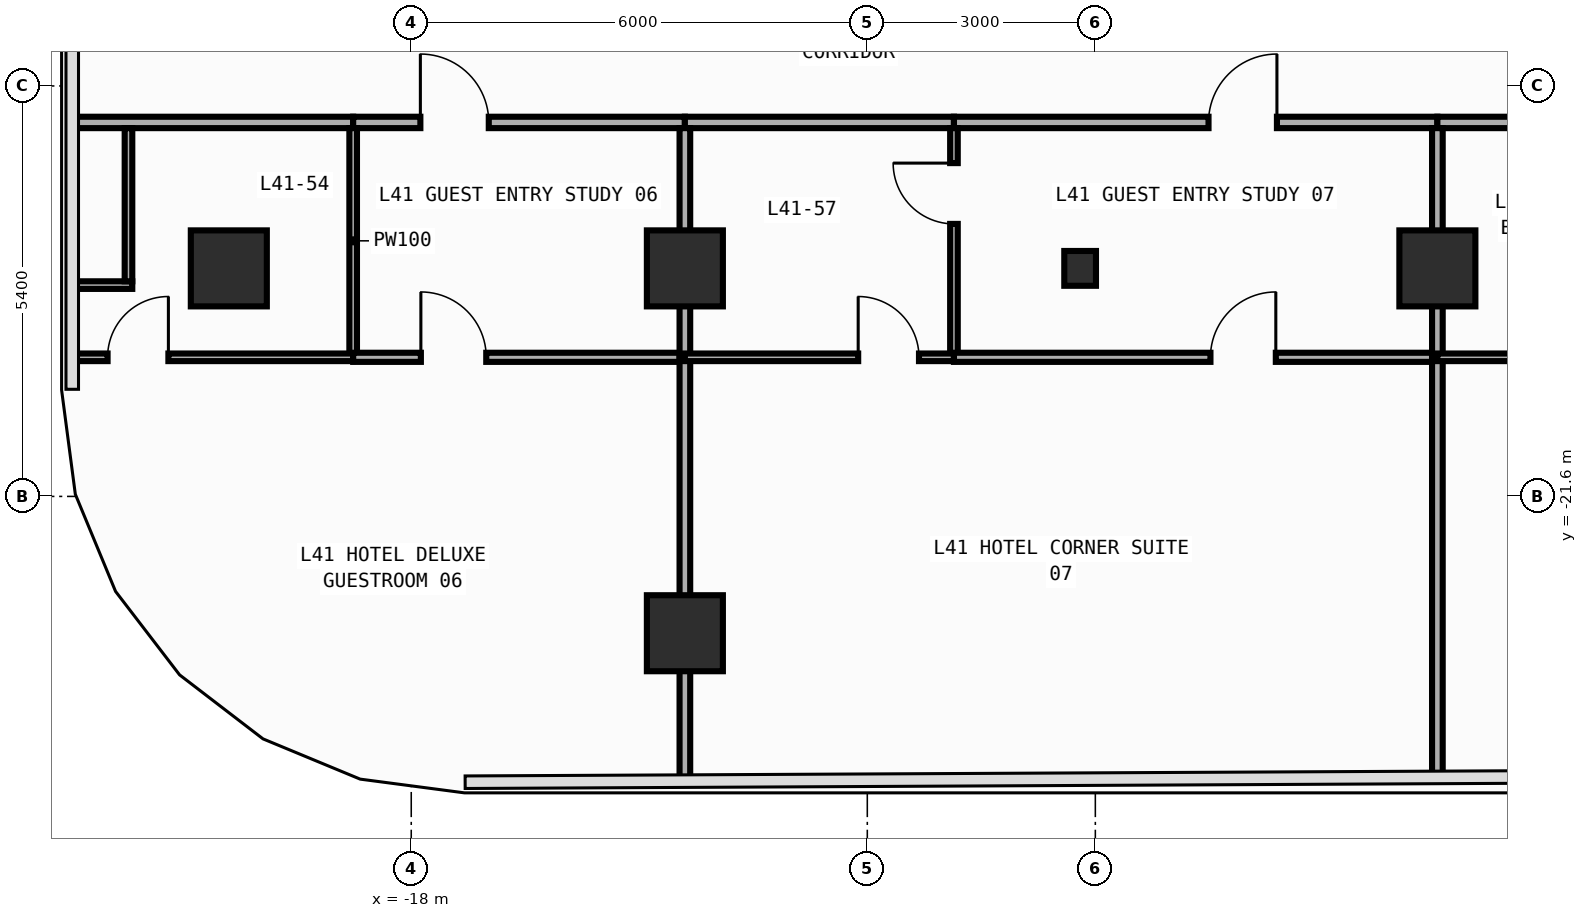
"""IFC4 building model, lengths in metres.
Left out: names, types, materials, properties, quantities, classifications, styles, units other than length and angle.
Written with IfcOpenShell. Run it as: python <this file> out.ifc"""

import sys

from ifc_helpers import new_model, si_unit, direction, frame, frame_2d, origin, origin_2d, place, context, subcontext, project, spatial, rectangle, i_section, extrude, element, fill, save


model = new_model("IFC4")
c1 = context("Model", 3, precision=1e-05, world=origin(), true_north=direction((0.0, 1.0)))
c2 = subcontext(c1, "Body", "Model", "MODEL_VIEW")
j1 = project(units=[si_unit("LENGTHUNIT", "METRE"), si_unit("PLANEANGLEUNIT", "RADIAN")], contexts=[c1])
p1 = place(None, origin())
s1 = spatial("IfcSite", under=j1, at=p1, CompositionType="ELEMENT")
p2 = place(p1, origin())
s2 = spatial("IfcBuilding", under=s1, at=p2, CompositionType="ELEMENT")
p3 = place(p2, frame((0.0, 0.0, 180.2)))
s3 = spatial("IfcBuildingStorey", under=s2, at=p3, CompositionType="ELEMENT", Elevation=180.2)
p4 = place(p3, frame((-9.2, -18.6, 0.0), z_axis=(0.0, 0.0, 1.0), x_axis=(1.0, 0.0, 0.0)))
e1 = element("IfcColumn", 1, at=p4, inside=s3, PredefinedType="COLUMN", context=c2, shape_type="SweptSolid", body=[
    extrude(i_section(OverallWidth=0.417, OverallDepth=0.458, WebThickness=0.03, FlangeThickness=0.05, FilletRadius=0.022, at=origin_2d()), origin(), (0.0, 0.0, 1.0), 3.8),
])
for number, where, z_axis, x_axis in (
    (2, (-20.4, -18.6, 0.0), (0.0, 0.0, 1.0), (1.0, 0.0, 0.0)),
    (3, (-14.4, -18.6, 0.0), (0.0, 0.0, 1.0), (1.0, 0.0, 0.0)),
    (4, (-4.5, -18.6, 0.0), (0.0, 0.0, 1.0), (1.0, 0.0, 0.0)),
    (5, (-14.4, -23.4, 0.0), (0.0, 0.0, 1.0), (1.0, 0.0, 0.0)),
):
    element("IfcColumn", number, at=place(p3, frame(where, z_axis=z_axis, x_axis=x_axis)), inside=s3, PredefinedType="COLUMN", context=c2, shape_type="SweptSolid", body=[
        extrude(rectangle(XDim=1.0, YDim=1.0, at=origin_2d()), origin(), (0.0, 0.0, 1.0), 3.8),
    ])
p5 = place(p3, frame((-22.455, -16.68, 0.0), z_axis=(0.0, 0.0, 1.0), x_axis=(1.0, 0.0, 0.0)))
e6 = element("IfcWall", 6, at=p5, inside=s3, PredefinedType="PARTITIONING", context=c2, shape_type="SweptSolid", body=[
    extrude(rectangle(XDim=3.691, YDim=0.15, at=frame_2d((1.846, 0.0))), origin(), (0.0, 0.0, 1.0), 3.54),
])
p6 = place(p3, frame((-18.764, -16.68, 0.0), z_axis=(0.0, 0.0, 1.0), x_axis=(1.0, 0.0, 0.0)))
e7 = element("IfcWall", 7, at=p6, inside=s3, PredefinedType="PARTITIONING", context=c2, shape_type="SweptSolid", body=[
    extrude(rectangle(XDim=4.364, YDim=0.15, at=frame_2d((2.182, 0.0))), origin(), (0.0, 0.0, 1.0), 3.54),
])
p7 = place(p6, frame((0.884, 0.0, 0.0)))
e8 = element("IfcOpeningElement", 8, at=p7, cuts=e7, PredefinedType="OPENING", context=c2, shape_type="SweptSolid", body=[
    extrude(rectangle(XDim=0.9, YDim=2.15, at=frame_2d((0.45, 1.075))), frame((0.0, 0.085, 0.0), z_axis=(0.0, -1.0, 0.0), x_axis=(1.0, 0.0, 0.0)), (0.0, 0.0, 1.0), 0.17),
])
p8 = place(p3, frame((-14.4, -16.68, 0.0), z_axis=(0.0, 0.0, 1.0), x_axis=(1.0, 0.0, 0.0)))
e9 = element("IfcWall", 9, at=p8, inside=s3, PredefinedType="PARTITIONING", context=c2, shape_type="SweptSolid", body=[
    extrude(rectangle(XDim=3.54, YDim=0.15, at=frame_2d((1.77, 0.0))), origin(), (0.0, 0.0, 1.0), 3.54),
])
p9 = place(p3, frame((-10.86, -16.68, 0.0), z_axis=(0.0, 0.0, 1.0), x_axis=(1.0, 0.0, 0.0)))
e10 = element("IfcWall", 10, at=p9, inside=s3, PredefinedType="PARTITIONING", context=c2, shape_type="SweptSolid", body=[
    extrude(rectangle(XDim=6.36, YDim=0.15, at=frame_2d((3.18, 0.0))), origin(), (0.0, 0.0, 1.0), 3.54),
])
p10 = place(p9, frame((3.349, 0.0, 0.0)))
e11 = element("IfcOpeningElement", 11, at=p10, cuts=e10, PredefinedType="OPENING", context=c2, shape_type="SweptSolid", body=[
    extrude(rectangle(XDim=0.9, YDim=2.15, at=frame_2d((0.45, 1.075))), frame((0.0, 0.085, 0.0), z_axis=(0.0, -1.0, 0.0), x_axis=(1.0, 0.0, 0.0)), (0.0, 0.0, 1.0), 0.17),
])
p11 = place(p3, frame((-4.5, -16.68, 0.0), z_axis=(0.0, 0.0, 1.0), x_axis=(1.0, 0.0, 0.0)))
e12 = element("IfcWall", 12, at=p11, inside=s3, PredefinedType="PARTITIONING", context=c2, shape_type="SweptSolid", body=[
    extrude(rectangle(XDim=3.54, YDim=0.15, at=frame_2d((1.77, 0.0))), origin(), (0.0, 0.0, 1.0), 3.54),
])
p12 = place(p3, frame((-18.764, -19.72, 0.0), z_axis=(0.0, 0.0, 1.0), x_axis=(0.0, 1.0, 0.0)))
e13 = element("IfcWall", 13, at=p12, inside=s3, PredefinedType="PARTITIONING", context=c2, shape_type="SweptSolid", body=[
    extrude(rectangle(XDim=2.965, YDim=0.1, at=frame_2d((1.482, 0.0))), origin(), (0.0, 0.0, 1.0), 3.54),
])
p13 = place(p3, frame((-22.455, -19.77, 0.0), z_axis=(0.0, 0.0, 1.0), x_axis=(1.0, 0.0, 0.0)))
e14 = element("IfcWall", 14, at=p13, inside=s3, PredefinedType="PARTITIONING", context=c2, shape_type="SweptSolid", body=[
    extrude(rectangle(XDim=3.691, YDim=0.1, at=frame_2d((1.846, 0.0))), origin(), (0.0, 0.0, 1.0), 3.54),
])
p14 = place(p13, frame((0.46, 0.0, 0.0)))
e15 = element("IfcOpeningElement", 15, at=p14, cuts=e14, PredefinedType="OPENING", context=c2, shape_type="SweptSolid", body=[
    extrude(rectangle(XDim=0.8, YDim=2.1, at=frame_2d((0.4, 1.05))), frame((0.0, 0.06, 0.0), z_axis=(0.0, -1.0, 0.0), x_axis=(1.0, 0.0, 0.0)), (0.0, 0.0, 1.0), 0.12),
])
p15 = place(p3, frame((-18.764, -19.77, 0.0), z_axis=(0.0, 0.0, 1.0), x_axis=(1.0, 0.0, 0.0)))
e16 = element("IfcWall", 16, at=p15, inside=s3, PredefinedType="PARTITIONING", context=c2, shape_type="SweptSolid", body=[
    extrude(rectangle(XDim=4.364, YDim=0.12, at=frame_2d((2.182, 0.0))), origin(), (0.0, 0.0, 1.0), 3.54),
])
p16 = place(p15, frame((0.891, 0.0, 0.0)))
e17 = element("IfcOpeningElement", 17, at=p16, cuts=e16, PredefinedType="OPENING", context=c2, shape_type="SweptSolid", body=[
    extrude(rectangle(XDim=0.86, YDim=2.15, at=frame_2d((0.43, 1.075))), frame((0.0, 0.07, 0.0), z_axis=(0.0, -1.0, 0.0), x_axis=(1.0, 0.0, 0.0)), (0.0, 0.0, 1.0), 0.14),
])
p17 = place(p3, frame((-14.4, -19.77, 0.0), z_axis=(0.0, 0.0, 1.0), x_axis=(0.0, 1.0, 0.0)))
e18 = element("IfcWall", 18, at=p17, inside=s3, PredefinedType="PARTITIONING", context=c2, shape_type="SweptSolid", body=[
    extrude(rectangle(XDim=3.015, YDim=0.14, at=frame_2d((1.508, 0.0))), origin(), (0.0, 0.0, 1.0), 2.952),
])
p18 = place(p3, frame((-14.4, -25.341, 0.0), z_axis=(0.0, 0.0, 1.0), x_axis=(0.0, 1.0, 0.0)))
e19 = element("IfcWall", 19, at=p18, inside=s3, PredefinedType="PARTITIONING", context=c2, shape_type="SweptSolid", body=[
    extrude(rectangle(XDim=5.571, YDim=0.14, at=frame_2d((2.785, 0.0))), origin(), (0.0, 0.0, 1.0), 2.952),
])
p19 = place(p3, frame((-10.86, -19.72, 0.0), z_axis=(0.0, 0.0, 1.0), x_axis=(0.0, 1.0, 0.0)))
e20 = element("IfcWall", 20, at=p19, inside=s3, PredefinedType="PARTITIONING", context=c2, shape_type="SweptSolid", body=[
    extrude(rectangle(XDim=2.965, YDim=0.1, at=frame_2d((1.482, 0.0))), origin(), (0.0, 0.0, 1.0), 3.54),
])
p20 = place(p19, frame((1.705, 0.0, 0.0)))
e21 = element("IfcOpeningElement", 21, at=p20, cuts=e20, PredefinedType="OPENING", context=c2, shape_type="SweptSolid", body=[
    extrude(rectangle(XDim=0.8, YDim=2.1, at=frame_2d((0.4, 1.05))), frame((0.0, 0.06, 0.0), z_axis=(0.0, -1.0, 0.0), x_axis=(1.0, 0.0, 0.0)), (0.0, 0.0, 1.0), 0.12),
])
p21 = place(p3, frame((-14.4, -19.77, 0.0), z_axis=(0.0, 0.0, 1.0), x_axis=(1.0, 0.0, 0.0)))
e22 = element("IfcWall", 22, at=p21, inside=s3, PredefinedType="PARTITIONING", context=c2, shape_type="SweptSolid", body=[
    extrude(rectangle(XDim=3.54, YDim=0.1, at=frame_2d((1.77, 0.0))), origin(), (0.0, 0.0, 1.0), 3.54),
])
p22 = place(p21, frame((2.28, 0.0, 0.0)))
e23 = element("IfcOpeningElement", 23, at=p22, cuts=e22, PredefinedType="OPENING", context=c2, shape_type="SweptSolid", body=[
    extrude(rectangle(XDim=0.8, YDim=2.1, at=frame_2d((0.4, 1.05))), frame((0.0, 0.06, 0.0), z_axis=(0.0, -1.0, 0.0), x_axis=(1.0, 0.0, 0.0)), (0.0, 0.0, 1.0), 0.12),
])
p23 = place(p3, frame((-10.86, -19.77, 0.0), z_axis=(0.0, 0.0, 1.0), x_axis=(1.0, 0.0, 0.0)))
e24 = element("IfcWall", 24, at=p23, inside=s3, PredefinedType="PARTITIONING", context=c2, shape_type="SweptSolid", body=[
    extrude(rectangle(XDim=6.36, YDim=0.12, at=frame_2d((3.18, 0.0))), origin(), (0.0, 0.0, 1.0), 3.54),
])
p24 = place(p23, frame((3.375, 0.0, 0.0)))
e25 = element("IfcOpeningElement", 25, at=p24, cuts=e24, PredefinedType="OPENING", context=c2, shape_type="SweptSolid", body=[
    extrude(rectangle(XDim=0.86, YDim=2.15, at=frame_2d((0.43, 1.075))), frame((0.0, 0.07, 0.0), z_axis=(0.0, -1.0, 0.0), x_axis=(1.0, 0.0, 0.0)), (0.0, 0.0, 1.0), 0.14),
])
p25 = place(p3, frame((-4.5, -19.77, 0.0), z_axis=(0.0, 0.0, 1.0), x_axis=(0.0, 1.0, 0.0)))
e26 = element("IfcWall", 26, at=p25, inside=s3, PredefinedType="PARTITIONING", context=c2, shape_type="SweptSolid", body=[
    extrude(rectangle(XDim=3.015, YDim=0.14, at=frame_2d((1.508, 0.0))), origin(), (0.0, 0.0, 1.0), 3.54),
])
p26 = place(p3, frame((-4.5, -25.292, 0.0), z_axis=(0.0, 0.0, 1.0), x_axis=(0.0, 1.0, 0.0)))
e27 = element("IfcWall", 27, at=p26, inside=s3, PredefinedType="PARTITIONING", context=c2, shape_type="SweptSolid", body=[
    extrude(rectangle(XDim=5.522, YDim=0.14, at=frame_2d((2.761, 0.0))), origin(), (0.0, 0.0, 1.0), 3.54),
])
p27 = place(p3, frame((-4.5, -19.77, 0.0), z_axis=(0.0, 0.0, 1.0), x_axis=(1.0, 0.0, 0.0)))
e28 = element("IfcWall", 28, at=p27, inside=s3, PredefinedType="PARTITIONING", context=c2, shape_type="SweptSolid", body=[
    extrude(rectangle(XDim=3.54, YDim=0.1, at=frame_2d((1.77, 0.0))), origin(), (0.0, 0.0, 1.0), 3.54),
])
p28 = place(p27, frame((1.875, 0.0, 0.0)))
e29 = element("IfcOpeningElement", 29, at=p28, cuts=e28, PredefinedType="OPENING", context=c2, shape_type="SweptSolid", body=[
    extrude(rectangle(XDim=0.8, YDim=2.1, at=frame_2d((0.4, 1.05))), frame((0.0, 0.06, 0.0), z_axis=(0.0, -1.0, 0.0), x_axis=(1.0, 0.0, 0.0)), (0.0, 0.0, 1.0), 0.12),
])
p29 = place(p3, frame((-21.67, -18.82, 0.0), z_axis=(0.0, 0.0, 1.0), x_axis=(-1.0, 0.0, 0.0)))
e30 = element("IfcWall", 30, at=p29, inside=s3, PredefinedType="PARTITIONING", context=c2, shape_type="SweptSolid", body=[
    extrude(rectangle(XDim=0.785, YDim=0.1, at=frame_2d((0.393, 0.0))), origin(), (0.0, 0.0, 1.0), 3.54),
])
p30 = place(p3, frame((-21.72, -18.77, 0.0), z_axis=(0.0, 0.0, 1.0), x_axis=(0.0, 1.0, 0.0)))
e31 = element("IfcWall", 31, at=p30, inside=s3, PredefinedType="PARTITIONING", context=c2, shape_type="SweptSolid", body=[
    extrude(rectangle(XDim=2.015, YDim=0.1, at=frame_2d((1.008, 0.0))), origin(), (0.0, 0.0, 1.0), 3.54),
])
p31 = place(p7, origin())
e32 = element("IfcDoor", 32, at=p31, inside=s3, OperationType="SINGLE_SWING_LEFT", PredefinedType="DOOR", context=c2, shape_type="SweptSolid", body=[
    extrude(rectangle(XDim=0.9, YDim=2.15, at=frame_2d((0.45, 1.075))), frame((0.0, 0.025, 0.0), z_axis=(0.0, -1.0, 0.0), x_axis=(1.0, 0.0, 0.0)), (0.0, 0.0, 1.0), 0.05),
])
fill(e8, e32)
p32 = place(p10, origin())
e33 = element("IfcDoor", 33, at=p32, inside=s3, OperationType="SINGLE_SWING_RIGHT", PredefinedType="DOOR", context=c2, shape_type="SweptSolid", body=[
    extrude(rectangle(XDim=0.9, YDim=2.15, at=frame_2d((0.45, 1.075))), frame((0.0, 0.025, 0.0), z_axis=(0.0, -1.0, 0.0), x_axis=(1.0, 0.0, 0.0)), (0.0, 0.0, 1.0), 0.05),
])
fill(e11, e33)
p33 = place(p14, origin())
e34 = element("IfcDoor", 34, at=p33, inside=s3, OperationType="SINGLE_SWING_RIGHT", PredefinedType="DOOR", context=c2, shape_type="SweptSolid", body=[
    extrude(rectangle(XDim=0.8, YDim=2.1, at=frame_2d((0.4, 1.05))), frame((0.0, 0.025, 0.0), z_axis=(0.0, -1.0, 0.0), x_axis=(1.0, 0.0, 0.0)), (0.0, 0.0, 1.0), 0.05),
])
fill(e15, e34)
p34 = place(p16, origin())
e35 = element("IfcDoor", 35, at=p34, inside=s3, OperationType="SINGLE_SWING_LEFT", PredefinedType="DOOR", context=c2, shape_type="SweptSolid", body=[
    extrude(rectangle(XDim=0.86, YDim=2.15, at=frame_2d((0.43, 1.075))), frame((0.0, 0.025, 0.0), z_axis=(0.0, -1.0, 0.0), x_axis=(1.0, 0.0, 0.0)), (0.0, 0.0, 1.0), 0.05),
])
fill(e17, e35)
p35 = place(p20, origin())
e36 = element("IfcDoor", 36, at=p35, inside=s3, OperationType="SINGLE_SWING_RIGHT", PredefinedType="DOOR", context=c2, shape_type="SweptSolid", body=[
    extrude(rectangle(XDim=0.8, YDim=2.1, at=frame_2d((0.4, 1.05))), frame((0.0, 0.025, 0.0), z_axis=(0.0, -1.0, 0.0), x_axis=(1.0, 0.0, 0.0)), (0.0, 0.0, 1.0), 0.05),
])
fill(e21, e36)
p36 = place(p22, origin())
e37 = element("IfcDoor", 37, at=p36, inside=s3, OperationType="SINGLE_SWING_LEFT", PredefinedType="DOOR", context=c2, shape_type="SweptSolid", body=[
    extrude(rectangle(XDim=0.8, YDim=2.1, at=frame_2d((0.4, 1.05))), frame((0.0, 0.025, 0.0), z_axis=(0.0, -1.0, 0.0), x_axis=(1.0, 0.0, 0.0)), (0.0, 0.0, 1.0), 0.05),
])
fill(e23, e37)
p37 = place(p24, origin())
e38 = element("IfcDoor", 38, at=p37, inside=s3, OperationType="SINGLE_SWING_RIGHT", PredefinedType="DOOR", context=c2, shape_type="SweptSolid", body=[
    extrude(rectangle(XDim=0.86, YDim=2.15, at=frame_2d((0.43, 1.075))), frame((0.0, 0.025, 0.0), z_axis=(0.0, -1.0, 0.0), x_axis=(1.0, 0.0, 0.0)), (0.0, 0.0, 1.0), 0.05),
])
fill(e25, e38)
save(model, sys.argv[1])
